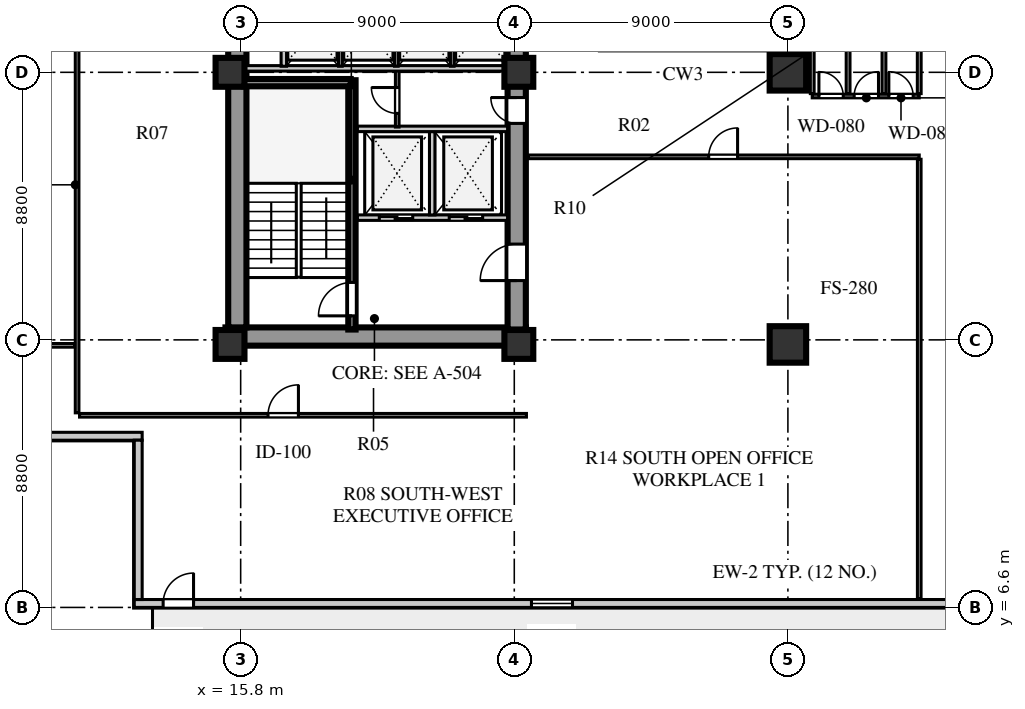
"""IFC4 building model, lengths in metres.
Left out: names, types, materials, properties, quantities, classifications, styles, units other than length and angle.
Written with IfcOpenShell. Run it as: python <this file> out.ifc"""

import sys

from ifc_helpers import new_model, si_unit, direction, frame, frame_2d, origin, origin_2d, place, context, subcontext, project, spatial, rectangle, extrude, element, fill, save


model = new_model("IFC4")
c1 = context("Model", 3, precision=1e-05, world=origin(), true_north=direction((0.0, 1.0)))
c2 = subcontext(c1, "Body", "Model", "MODEL_VIEW")
j1 = project(units=[si_unit("LENGTHUNIT", "METRE"), si_unit("PLANEANGLEUNIT", "RADIAN")], contexts=[c1])
p1 = place(None, origin())
s1 = spatial("IfcSite", under=j1, at=p1, CompositionType="ELEMENT")
p2 = place(p1, origin())
s2 = spatial("IfcBuilding", under=s1, at=p2, CompositionType="ELEMENT")
p3 = place(p2, frame((0.0, 0.0, 26.0)))
s3 = spatial("IfcBuildingStorey", under=s2, at=p3, CompositionType="ELEMENT", Elevation=26.0)
p4 = place(p3, frame((15.3, 15.51, 0.0), z_axis=(0.0, 0.0, 1.0), x_axis=(1.0, 0.0, 0.0)))
e1 = element("IfcWall", 1, at=p4, inside=s3, PredefinedType="SHEAR", context=c2, shape_type="SweptSolid", body=[
    extrude(rectangle(XDim=9.88, YDim=0.6, at=frame_2d((4.94, 0.0))), origin(), (0.0, 0.0, 1.0), 3.72),
])
p5 = place(p3, frame((15.69, 15.81, 0.0), z_axis=(0.0, 0.0, 1.0), x_axis=(0.0, 1.0, 0.0)))
e2 = element("IfcWall", 2, at=p5, inside=s3, PredefinedType="SHEAR", context=c2, shape_type="SweptSolid", body=[
    extrude(rectangle(XDim=25.63, YDim=0.6, at=frame_2d((12.815, 0.0))), origin(), (0.0, 0.0, 1.0), 3.72),
])
p6 = place(p3, frame((24.88, 15.74, 0.0), z_axis=(0.0, 0.0, 1.0), x_axis=(0.0, 1.0, 0.0)))
e3 = element("IfcWall", 3, at=p6, inside=s3, PredefinedType="SHEAR", context=c2, shape_type="SweptSolid", body=[
    extrude(rectangle(XDim=25.76, YDim=0.6, at=frame_2d((12.88, 0.0))), origin(), (0.0, 0.0, 1.0), 3.72),
])
p7 = place(p6, frame((1.61, 0.0, 0.0)))
e4 = element("IfcOpeningElement", 4, at=p7, cuts=e3, PredefinedType="OPENING", context=c2, shape_type="SweptSolid", body=[
    extrude(rectangle(XDim=1.2, YDim=2.1, at=frame_2d((0.6, 1.05))), frame((0.0, 0.31, 0.0), z_axis=(0.0, -1.0, 0.0), x_axis=(1.0, 0.0, 0.0)), (0.0, 0.0, 1.0), 0.62),
])
p8 = place(p6, frame((6.78, 0.0, 0.0)))
e5 = element("IfcOpeningElement", 5, at=p8, cuts=e3, PredefinedType="OPENING", context=c2, shape_type="SweptSolid", body=[
    extrude(rectangle(XDim=0.85, YDim=2.06, at=frame_2d((0.425, 1.03))), frame((0.0, 0.31, 0.0), z_axis=(0.0, -1.0, 0.0), x_axis=(1.0, 0.0, 0.0)), (0.0, 0.0, 1.0), 0.62),
])
p9 = place(p6, frame((12.11, 0.0, 0.0)))
e6 = element("IfcOpeningElement", 6, at=p9, cuts=e3, PredefinedType="OPENING", context=c2, shape_type="SweptSolid", body=[
    extrude(rectangle(XDim=1.5, YDim=2.12, at=frame_2d((0.75, 1.06))), frame((0.0, 0.31, 0.0), z_axis=(0.0, -1.0, 0.0), x_axis=(1.0, 0.0, 0.0)), (0.0, 0.0, 1.0), 0.62),
])
p10 = place(p6, frame((20.11, 0.0, 0.0)))
e7 = element("IfcOpeningElement", 7, at=p10, cuts=e3, PredefinedType="OPENING", context=c2, shape_type="SweptSolid", body=[
    extrude(rectangle(XDim=1.2, YDim=2.12, at=frame_2d((0.6, 1.06))), frame((0.0, 0.31, 0.0), z_axis=(0.0, -1.0, 0.0), x_axis=(1.0, 0.0, 0.0)), (0.0, 0.0, 1.0), 0.62),
])
p11 = place(p6, frame((24.01, 0.0, 0.0)))
e8 = element("IfcOpeningElement", 8, at=p11, cuts=e3, PredefinedType="OPENING", context=c2, shape_type="SweptSolid", body=[
    extrude(rectangle(XDim=0.95, YDim=2.1, at=frame_2d((0.475, 1.05))), frame((0.0, 0.31, 0.0), z_axis=(0.0, -1.0, 0.0), x_axis=(1.0, 0.0, 0.0)), (0.0, 0.0, 1.0), 0.62),
])
for number, where, z_axis, x_axis in (
    (9, (15.45, 15.25, 0.0), (0.0, 0.0, 1.0), (1.0, 0.0, 0.0)),
    (10, (15.45, 24.2, 0.0), (0.0, 0.0, 1.0), (1.0, 0.0, 0.0)),
    (11, (24.95, 15.25, 0.0), (0.0, 0.0, 1.0), (1.0, 0.0, 0.0)),
    (12, (24.95, 24.2, 0.0), (0.0, 0.0, 1.0), (1.0, 0.0, 0.0)),
):
    element("IfcColumn", number, at=place(p3, frame(where, z_axis=z_axis, x_axis=x_axis)), inside=s3, PredefinedType="COLUMN", context=c2, shape_type="SweptSolid", body=[
        extrude(rectangle(XDim=0.95, YDim=0.95, at=origin_2d()), origin(), (0.0, 0.0, 1.0), 3.72),
    ])
for number, where, z_axis, x_axis in (
    (13, (33.8, 15.25, 0.0), (0.0, 0.0, 1.0), (1.0, 0.0, 0.0)),
    (14, (33.8, 24.2, 0.0), (0.0, 0.0, 1.0), (1.0, 0.0, 0.0)),
):
    element("IfcColumn", number, at=place(p3, frame(where, z_axis=z_axis, x_axis=x_axis)), inside=s3, PredefinedType="COLUMN", context=c2, shape_type="SweptSolid", body=[
        extrude(rectangle(XDim=1.2, YDim=1.2, at=origin_2d()), origin(), (0.0, 0.0, 1.0), 3.72),
    ])
p12 = place(p3, frame((12.3, 6.73, 0.0), z_axis=(0.0, 0.0, 1.0), x_axis=(1.0, 0.0, 0.0)))
e15 = element("IfcWall", 15, at=p12, inside=s3, PredefinedType="SOLIDWALL", context=c2, shape_type="SweptSolid", body=[
    extrude(rectangle(XDim=34.0, YDim=0.26, at=frame_2d((17.0, 0.0))), origin(), (0.0, 0.0, 1.0), 3.72),
])
p13 = place(p12, frame((0.95, 0.0, 0.0)))
e16 = element("IfcOpeningElement", 16, at=p13, cuts=e15, PredefinedType="OPENING", context=c2, shape_type="SweptSolid", body=[
    extrude(rectangle(XDim=1.0, YDim=2.05, at=frame_2d((0.5, 1.025))), frame((0.0, 0.14, 0.0), z_axis=(0.0, -1.0, 0.0), x_axis=(1.0, 0.0, 0.0)), (0.0, 0.0, 1.0), 0.28),
])
p14 = place(p12, frame((13.065, 0.0, 0.8)))
e17 = element("IfcOpeningElement", 17, at=p14, cuts=e15, PredefinedType="OPENING", context=c2, shape_type="SweptSolid", body=[
    extrude(rectangle(XDim=1.35, YDim=1.9, at=frame_2d((0.675, 0.95))), frame((0.0, 0.14, 0.0), z_axis=(0.0, -1.0, 0.0), x_axis=(1.0, 0.0, 0.0)), (0.0, 0.0, 1.0), 0.28),
])
p15 = place(p12, frame((29.03, 0.0, 0.8)))
e18 = element("IfcOpeningElement", 18, at=p15, cuts=e15, PredefinedType="OPENING", context=c2, shape_type="SweptSolid", body=[
    extrude(rectangle(XDim=1.65, YDim=1.95, at=frame_2d((0.825, 0.975))), frame((0.0, 0.14, 0.0), z_axis=(0.0, -1.0, 0.0), x_axis=(1.0, 0.0, 0.0)), (0.0, 0.0, 1.0), 0.28),
])
p16 = place(p3, frame((6.8, 12.23, 0.0), z_axis=(0.0, 0.0, 1.0), x_axis=(1.0, 0.0, 0.0)))
e19 = element("IfcWall", 19, at=p16, inside=s3, PredefinedType="SOLIDWALL", context=c2, shape_type="SweptSolid", body=[
    extrude(rectangle(XDim=5.76, YDim=0.26, at=frame_2d((2.88, 0.0))), origin(), (0.0, 0.0, 1.0), 3.72),
])
p17 = place(p3, frame((12.43, 12.1, 0.0), z_axis=(0.0, 0.0, 1.0), x_axis=(0.0, -1.0, 0.0)))
e20 = element("IfcWall", 20, at=p17, inside=s3, PredefinedType="SOLIDWALL", context=c2, shape_type="SweptSolid", body=[
    extrude(rectangle(XDim=5.24, YDim=0.26, at=frame_2d((2.62, 0.0))), origin(), (0.0, 0.0, 1.0), 3.72),
])
p18 = place(p3, frame((19.46, 15.74, 0.0), z_axis=(0.0, 0.0, 1.0), x_axis=(0.0, 1.0, 0.0)))
e21 = element("IfcWall", 21, at=p18, inside=s3, PredefinedType="SHEAR", context=c2, shape_type="SweptSolid", body=[
    extrude(rectangle(XDim=8.2, YDim=0.24, at=frame_2d((4.1, 0.0))), origin(), (0.0, 0.0, 1.0), 4.0),
])
p19 = place(p18, frame((0.45, 0.0, 0.0)))
e22 = element("IfcOpeningElement", 22, at=p19, cuts=e21, PredefinedType="OPENING", context=c2, shape_type="SweptSolid", body=[
    extrude(rectangle(XDim=1.1, YDim=2.1, at=frame_2d((0.55, 1.05))), frame((0.0, 0.13, 0.0), z_axis=(0.0, -1.0, 0.0), x_axis=(1.0, 0.0, 0.0)), (0.0, 0.0, 1.0), 0.26),
])
p20 = place(p3, frame((15.9, 23.86, 0.0), z_axis=(0.0, 0.0, 1.0), x_axis=(1.0, 0.0, 0.0)))
e23 = element("IfcWall", 23, at=p20, inside=s3, PredefinedType="SHEAR", context=c2, shape_type="SweptSolid", body=[
    extrude(rectangle(XDim=3.52, YDim=0.24, at=frame_2d((1.76, 0.0))), origin(), (0.0, 0.0, 1.0), 4.0),
])
p21 = place(p3, frame((19.64, 19.42, 0.0), z_axis=(0.0, 0.0, 1.0), x_axis=(1.0, 0.0, 0.0)))
e24 = element("IfcWall", 24, at=p21, inside=s3, PredefinedType="SOLIDWALL", context=c2, shape_type="SweptSolid", body=[
    extrude(rectangle(XDim=4.94, YDim=0.18, at=frame_2d((2.47, 0.0))), origin(), (0.0, 0.0, 1.0), 3.72),
])
p22 = place(p21, frame((0.72, 0.0, 0.0)))
e25 = element("IfcOpeningElement", 25, at=p22, cuts=e24, PredefinedType="OPENING", context=c2, shape_type="SweptSolid", body=[
    extrude(rectangle(XDim=1.1, YDim=2.1, at=frame_2d((0.55, 1.05))), frame((0.0, 0.1, 0.0), z_axis=(0.0, -1.0, 0.0), x_axis=(1.0, 0.0, 0.0)), (0.0, 0.0, 1.0), 0.2),
])
p23 = place(p21, frame((3.02, 0.0, 0.0)))
e26 = element("IfcOpeningElement", 26, at=p23, cuts=e24, PredefinedType="OPENING", context=c2, shape_type="SweptSolid", body=[
    extrude(rectangle(XDim=1.1, YDim=2.1, at=frame_2d((0.55, 1.05))), frame((0.0, 0.1, 0.0), z_axis=(0.0, -1.0, 0.0), x_axis=(1.0, 0.0, 0.0)), (0.0, 0.0, 1.0), 0.2),
])
p24 = place(p3, frame((22.1, 19.51, 0.0), z_axis=(0.0, 0.0, 1.0), x_axis=(0.0, 1.0, 0.0)))
e27 = element("IfcWall", 27, at=p24, inside=s3, PredefinedType="SOLIDWALL", context=c2, shape_type="SweptSolid", body=[
    extrude(rectangle(XDim=2.74, YDim=0.18, at=frame_2d((1.37, 0.0))), origin(), (0.0, 0.0, 1.0), 3.72),
])
p25 = place(p3, frame((19.64, 22.34, 0.0), z_axis=(0.0, 0.0, 1.0), x_axis=(1.0, 0.0, 0.0)))
e28 = element("IfcWall", 28, at=p25, inside=s3, PredefinedType="SOLIDWALL", context=c2, shape_type="SweptSolid", body=[
    extrude(rectangle(XDim=4.94, YDim=0.18, at=frame_2d((2.47, 0.0))), origin(), (0.0, 0.0, 1.0), 3.72),
])
p26 = place(p3, frame((20.95, 22.4, 0.0), z_axis=(0.0, 0.0, 1.0), x_axis=(0.0, 1.0, 0.0)))
e29 = element("IfcWall", 29, at=p26, inside=s3, PredefinedType="PARTITIONING", context=c2, shape_type="SweptSolid", body=[
    extrude(rectangle(XDim=1.88, YDim=0.12, at=frame_2d((0.94, 0.0))), origin(), (0.0, 0.0, 1.0), 3.72),
])
p27 = place(p26, frame((0.45, 0.0, 0.0)))
e30 = element("IfcOpeningElement", 30, at=p27, cuts=e29, PredefinedType="OPENING", context=c2, shape_type="SweptSolid", body=[
    extrude(rectangle(XDim=0.85, YDim=2.06, at=frame_2d((0.425, 1.03))), frame((0.0, 0.07, 0.0), z_axis=(0.0, -1.0, 0.0), x_axis=(1.0, 0.0, 0.0)), (0.0, 0.0, 1.0), 0.14),
])
p28 = place(p3, frame((15.9, 24.33, 0.0), z_axis=(0.0, 0.0, 1.0), x_axis=(1.0, 0.0, 0.0)))
e31 = element("IfcWall", 31, at=p28, inside=s3, PredefinedType="SOLIDWALL", context=c2, shape_type="SweptSolid", body=[
    extrude(rectangle(XDim=8.68, YDim=0.18, at=frame_2d((4.34, 0.0))), origin(), (0.0, 0.0, 1.0), 3.02),
])
p29 = place(p3, frame((17.22, 24.4, 0.0), z_axis=(0.0, 0.0, 1.0), x_axis=(0.0, 1.0, 0.0)))
e32 = element("IfcWall", 32, at=p29, inside=s3, PredefinedType="SOLIDWALL", context=c2, shape_type="SweptSolid", body=[
    extrude(rectangle(XDim=2.05, YDim=0.18, at=frame_2d((1.025, 0.0))), origin(), (0.0, 0.0, 1.0), 3.72),
])
for number, where, z_axis, x_axis in (
    (33, (19.08, 24.4, 0.0), (0.0, 0.0, 1.0), (0.0, 1.0, 0.0)),
    (34, (20.92, 24.4, 0.0), (0.0, 0.0, 1.0), (0.0, 1.0, 0.0)),
    (35, (22.76, 24.4, 0.0), (0.0, 0.0, 1.0), (0.0, 1.0, 0.0)),
):
    element("IfcWall", number, at=place(p3, frame(where, z_axis=z_axis, x_axis=x_axis)), inside=s3, PredefinedType="PARTITIONING", context=c2, shape_type="SweptSolid", body=[
        extrude(rectangle(XDim=2.05, YDim=0.12, at=frame_2d((1.025, 0.0))), origin(), (0.0, 0.0, 1.0), 3.72),
    ])
p30 = place(p3, frame((25.25, 21.42, 0.0), z_axis=(0.0, 0.0, 1.0), x_axis=(1.0, 0.0, 0.0)))
e36 = element("IfcWall", 36, at=p30, inside=s3, PredefinedType="PARTITIONING", context=c2, shape_type="SweptSolid", body=[
    extrude(rectangle(XDim=12.87, YDim=0.12, at=frame_2d((6.435, 0.0))), origin(), (0.0, 0.0, 1.0), 3.32),
])
p31 = place(p30, frame((5.945, 0.0, 0.0)))
e37 = element("IfcOpeningElement", 37, at=p31, cuts=e36, PredefinedType="OPENING", context=c2, shape_type="SweptSolid", body=[
    extrude(rectangle(XDim=0.95, YDim=2.08, at=frame_2d((0.475, 1.04))), frame((0.0, 0.07, 0.0), z_axis=(0.0, -1.0, 0.0), x_axis=(1.0, 0.0, 0.0)), (0.0, 0.0, 1.0), 0.14),
])
p32 = place(p3, frame((38.12, 6.88, 0.0), z_axis=(0.0, 0.0, 1.0), x_axis=(0.0, 1.0, 0.0)))
e38 = element("IfcWall", 38, at=p32, inside=s3, PredefinedType="PARTITIONING", context=c2, shape_type="SweptSolid", body=[
    extrude(rectangle(XDim=14.46, YDim=0.12, at=frame_2d((7.23, 0.0))), origin(), (0.0, 0.0, 1.0), 3.72),
])
p33 = place(p3, frame((34.6, 23.42, 0.0), z_axis=(0.0, 0.0, 1.0), x_axis=(1.0, 0.0, 0.0)))
e39 = element("IfcWall", 39, at=p33, inside=s3, PredefinedType="PARTITIONING", context=c2, shape_type="SweptSolid", body=[
    extrude(rectangle(XDim=3.52, YDim=0.12, at=frame_2d((1.76, 0.0))), origin(), (0.0, 0.0, 1.0), 3.72),
])
p34 = place(p33, frame((0.22, 0.0, 0.0)))
e40 = element("IfcOpeningElement", 40, at=p34, cuts=e39, PredefinedType="OPENING", context=c2, shape_type="SweptSolid", body=[
    extrude(rectangle(XDim=0.8, YDim=2.05, at=frame_2d((0.4, 1.025))), frame((0.0, 0.07, 0.0), z_axis=(0.0, -1.0, 0.0), x_axis=(1.0, 0.0, 0.0)), (0.0, 0.0, 1.0), 0.14),
])
p35 = place(p33, frame((1.38, 0.0, 0.0)))
e41 = element("IfcOpeningElement", 41, at=p35, cuts=e39, PredefinedType="OPENING", context=c2, shape_type="SweptSolid", body=[
    extrude(rectangle(XDim=0.8, YDim=2.05, at=frame_2d((0.4, 1.025))), frame((0.0, 0.07, 0.0), z_axis=(0.0, -1.0, 0.0), x_axis=(1.0, 0.0, 0.0)), (0.0, 0.0, 1.0), 0.14),
])
p36 = place(p33, frame((2.52, 0.0, 0.0)))
e42 = element("IfcOpeningElement", 42, at=p36, cuts=e39, PredefinedType="OPENING", context=c2, shape_type="SweptSolid", body=[
    extrude(rectangle(XDim=0.8, YDim=2.05, at=frame_2d((0.4, 1.025))), frame((0.0, 0.07, 0.0), z_axis=(0.0, -1.0, 0.0), x_axis=(1.0, 0.0, 0.0)), (0.0, 0.0, 1.0), 0.14),
])
p37 = place(p3, frame((10.42, 13.0, 0.0), z_axis=(0.0, 0.0, 1.0), x_axis=(0.0, 1.0, 0.0)))
e43 = element("IfcWall", 43, at=p37, inside=s3, PredefinedType="PARTITIONING", context=c2, shape_type="SweptSolid", body=[
    extrude(rectangle(XDim=31.2, YDim=0.12, at=frame_2d((15.6, 0.0))), origin(), (0.0, 0.0, 1.0), 3.72),
])
p38 = place(p37, frame((15.15, 0.0, 0.0)))
e44 = element("IfcOpeningElement", 44, at=p38, cuts=e43, PredefinedType="OPENING", context=c2, shape_type="SweptSolid", body=[
    extrude(rectangle(XDim=0.95, YDim=2.08, at=frame_2d((0.475, 1.04))), frame((0.0, 0.07, 0.0), z_axis=(0.0, -1.0, 0.0), x_axis=(1.0, 0.0, 0.0)), (0.0, 0.0, 1.0), 0.14),
])
p39 = place(p3, frame((7.08, 15.22, 0.0), z_axis=(0.0, 0.0, 1.0), x_axis=(1.0, 0.0, 0.0)))
e45 = element("IfcWall", 45, at=p39, inside=s3, PredefinedType="PARTITIONING", context=c2, shape_type="SweptSolid", body=[
    extrude(rectangle(XDim=3.26, YDim=0.12, at=frame_2d((1.63, 0.0))), origin(), (0.0, 0.0, 1.0), 3.22),
])
p40 = place(p3, frame((10.5, 12.92, 0.0), z_axis=(0.0, 0.0, 1.0), x_axis=(1.0, 0.0, 0.0)))
e46 = element("IfcWall", 46, at=p40, inside=s3, PredefinedType="PARTITIONING", context=c2, shape_type="SweptSolid", body=[
    extrude(rectangle(XDim=14.7, YDim=0.12, at=frame_2d((7.35, 0.0))), origin(), (0.0, 0.0, 1.0), 3.72),
])
p41 = place(p40, frame((6.2, 0.0, 0.0)))
e47 = element("IfcOpeningElement", 47, at=p41, cuts=e46, PredefinedType="OPENING", context=c2, shape_type="SweptSolid", body=[
    extrude(rectangle(XDim=1.0, YDim=2.08, at=frame_2d((0.5, 1.04))), frame((0.0, 0.07, 0.0), z_axis=(0.0, -1.0, 0.0), x_axis=(1.0, 0.0, 0.0)), (0.0, 0.0, 1.0), 0.14),
])
for number, where, z_axis, x_axis in (
    (48, (34.6, 23.5, 0.0), (0.0, 0.0, 1.0), (0.0, 1.0, 0.0)),
    (49, (38.12, 23.5, 0.0), (0.0, 0.0, 1.0), (0.0, 1.0, 0.0)),
    (50, (35.78, 23.5, 0.0), (0.0, 0.0, 1.0), (0.0, 1.0, 0.0)),
    (51, (36.96, 23.5, 0.0), (0.0, 0.0, 1.0), (0.0, 1.0, 0.0)),
):
    element("IfcWall", number, at=place(p3, frame(where, z_axis=z_axis, x_axis=x_axis)), inside=s3, PredefinedType="PLUMBINGWALL", context=c2, shape_type="SweptSolid", body=[
        extrude(rectangle(XDim=3.62, YDim=0.125, at=frame_2d((1.81, 0.0))), origin(), (0.0, 0.0, 1.0), 3.72),
    ])
p42 = place(p13, frame((1.0, 0.0, 0.0), z_axis=(0.0, 0.0, 1.0), x_axis=(-1.0, 0.0, 0.0)))
e52 = element("IfcDoor", 52, at=p42, inside=s3, OperationType="SINGLE_SWING_LEFT", PredefinedType="DOOR", context=c2, shape_type="SweptSolid", body=[
    extrude(rectangle(XDim=1.0, YDim=2.05, at=frame_2d((0.5, 1.025))), frame((0.0, 0.025, 0.0), z_axis=(0.0, -1.0, 0.0), x_axis=(1.0, 0.0, 0.0)), (0.0, 0.0, 1.0), 0.05),
])
fill(e16, e52)
p43 = place(p14, origin())
e53 = element("IfcWindow", 53, at=p43, inside=s3, PartitioningType="SINGLE_PANEL", PredefinedType="WINDOW", context=c2, shape_type="SweptSolid", body=[
    extrude(rectangle(XDim=1.35, YDim=1.9, at=frame_2d((0.675, 0.95))), frame((0.0, 0.03, 0.0), z_axis=(0.0, -1.0, 0.0), x_axis=(1.0, 0.0, 0.0)), (0.0, 0.0, 1.0), 0.06),
])
fill(e17, e53)
p44 = place(p19, origin())
e54 = element("IfcDoor", 54, at=p44, inside=s3, OperationType="SINGLE_SWING_LEFT", PredefinedType="DOOR", context=c2, shape_type="SweptSolid", body=[
    extrude(rectangle(XDim=1.1, YDim=2.1, at=frame_2d((0.55, 1.05))), frame((0.0, 0.025, 0.0), z_axis=(0.0, -1.0, 0.0), x_axis=(1.0, 0.0, 0.0)), (0.0, 0.0, 1.0), 0.05),
])
fill(e22, e54)
p45 = place(p22, origin())
e55 = element("IfcDoor", 55, at=p45, inside=s3, OperationType="DOUBLE_DOOR_SLIDING", PredefinedType="DOOR", context=c2, shape_type="SweptSolid", body=[
    extrude(rectangle(XDim=1.1, YDim=2.1, at=frame_2d((0.55, 1.05))), frame((0.0, 0.025, 0.0), z_axis=(0.0, -1.0, 0.0), x_axis=(1.0, 0.0, 0.0)), (0.0, 0.0, 1.0), 0.05),
])
fill(e25, e55)
p46 = place(p23, origin())
e56 = element("IfcDoor", 56, at=p46, inside=s3, OperationType="DOUBLE_DOOR_SLIDING", PredefinedType="DOOR", context=c2, shape_type="SweptSolid", body=[
    extrude(rectangle(XDim=1.1, YDim=2.1, at=frame_2d((0.55, 1.05))), frame((0.0, 0.025, 0.0), z_axis=(0.0, -1.0, 0.0), x_axis=(1.0, 0.0, 0.0)), (0.0, 0.0, 1.0), 0.05),
])
fill(e26, e56)
p47 = place(p7, frame((1.2, 0.0, 0.0), z_axis=(0.0, 0.0, 1.0), x_axis=(-1.0, 0.0, 0.0)))
e57 = element("IfcDoor", 57, at=p47, inside=s3, OperationType="SINGLE_SWING_RIGHT", PredefinedType="DOOR", context=c2, shape_type="SweptSolid", body=[
    extrude(rectangle(XDim=1.2, YDim=2.1, at=frame_2d((0.6, 1.05))), frame((0.0, 0.025, 0.0), z_axis=(0.0, -1.0, 0.0), x_axis=(1.0, 0.0, 0.0)), (0.0, 0.0, 1.0), 0.05),
])
fill(e4, e57)
p48 = place(p27, origin())
e58 = element("IfcDoor", 58, at=p48, inside=s3, OperationType="SINGLE_SWING_RIGHT", PredefinedType="DOOR", context=c2, shape_type="SweptSolid", body=[
    extrude(rectangle(XDim=0.85, YDim=2.06, at=frame_2d((0.425, 1.03))), frame((0.0, 0.025, 0.0), z_axis=(0.0, -1.0, 0.0), x_axis=(1.0, 0.0, 0.0)), (0.0, 0.0, 1.0), 0.05),
])
fill(e30, e58)
p49 = place(p8, frame((0.85, 0.0, 0.0), z_axis=(0.0, 0.0, 1.0), x_axis=(-1.0, 0.0, 0.0)))
e59 = element("IfcDoor", 59, at=p49, inside=s3, OperationType="SINGLE_SWING_LEFT", PredefinedType="DOOR", context=c2, shape_type="SweptSolid", body=[
    extrude(rectangle(XDim=0.85, YDim=2.06, at=frame_2d((0.425, 1.03))), frame((0.0, 0.025, 0.0), z_axis=(0.0, -1.0, 0.0), x_axis=(1.0, 0.0, 0.0)), (0.0, 0.0, 1.0), 0.05),
])
fill(e5, e59)
p50 = place(p41, frame((1.0, 0.0, 0.0), z_axis=(0.0, 0.0, 1.0), x_axis=(-1.0, 0.0, 0.0)))
e60 = element("IfcDoor", 60, at=p50, inside=s3, OperationType="SINGLE_SWING_LEFT", PredefinedType="DOOR", context=c2, shape_type="SweptSolid", body=[
    extrude(rectangle(XDim=1.0, YDim=2.08, at=frame_2d((0.5, 1.04))), frame((0.0, 0.025, 0.0), z_axis=(0.0, -1.0, 0.0), x_axis=(1.0, 0.0, 0.0)), (0.0, 0.0, 1.0), 0.05),
])
fill(e47, e60)
p51 = place(p34, origin())
e61 = element("IfcDoor", 61, at=p51, inside=s3, OperationType="SINGLE_SWING_LEFT", PredefinedType="DOOR", context=c2, shape_type="SweptSolid", body=[
    extrude(rectangle(XDim=0.8, YDim=2.05, at=frame_2d((0.4, 1.025))), frame((0.0, 0.025, 0.0), z_axis=(0.0, -1.0, 0.0), x_axis=(1.0, 0.0, 0.0)), (0.0, 0.0, 1.0), 0.05),
])
fill(e40, e61)
p52 = place(p35, origin())
e62 = element("IfcDoor", 62, at=p52, inside=s3, OperationType="SINGLE_SWING_RIGHT", PredefinedType="DOOR", context=c2, shape_type="SweptSolid", body=[
    extrude(rectangle(XDim=0.8, YDim=2.05, at=frame_2d((0.4, 1.025))), frame((0.0, 0.025, 0.0), z_axis=(0.0, -1.0, 0.0), x_axis=(1.0, 0.0, 0.0)), (0.0, 0.0, 1.0), 0.05),
])
fill(e41, e62)
p53 = place(p36, origin())
e63 = element("IfcDoor", 63, at=p53, inside=s3, OperationType="SINGLE_SWING_LEFT", PredefinedType="DOOR", context=c2, shape_type="SweptSolid", body=[
    extrude(rectangle(XDim=0.8, YDim=2.05, at=frame_2d((0.4, 1.025))), frame((0.0, 0.025, 0.0), z_axis=(0.0, -1.0, 0.0), x_axis=(1.0, 0.0, 0.0)), (0.0, 0.0, 1.0), 0.05),
])
fill(e42, e63)
p54 = place(p31, frame((0.95, 0.0, 0.0), z_axis=(0.0, 0.0, 1.0), x_axis=(-1.0, 0.0, 0.0)))
e64 = element("IfcDoor", 64, at=p54, inside=s3, OperationType="SINGLE_SWING_LEFT", PredefinedType="DOOR", context=c2, shape_type="SweptSolid", body=[
    extrude(rectangle(XDim=0.95, YDim=2.08, at=frame_2d((0.475, 1.04))), frame((0.0, 0.025, 0.0), z_axis=(0.0, -1.0, 0.0), x_axis=(1.0, 0.0, 0.0)), (0.0, 0.0, 1.0), 0.05),
])
fill(e37, e64)
save(model, sys.argv[1])
